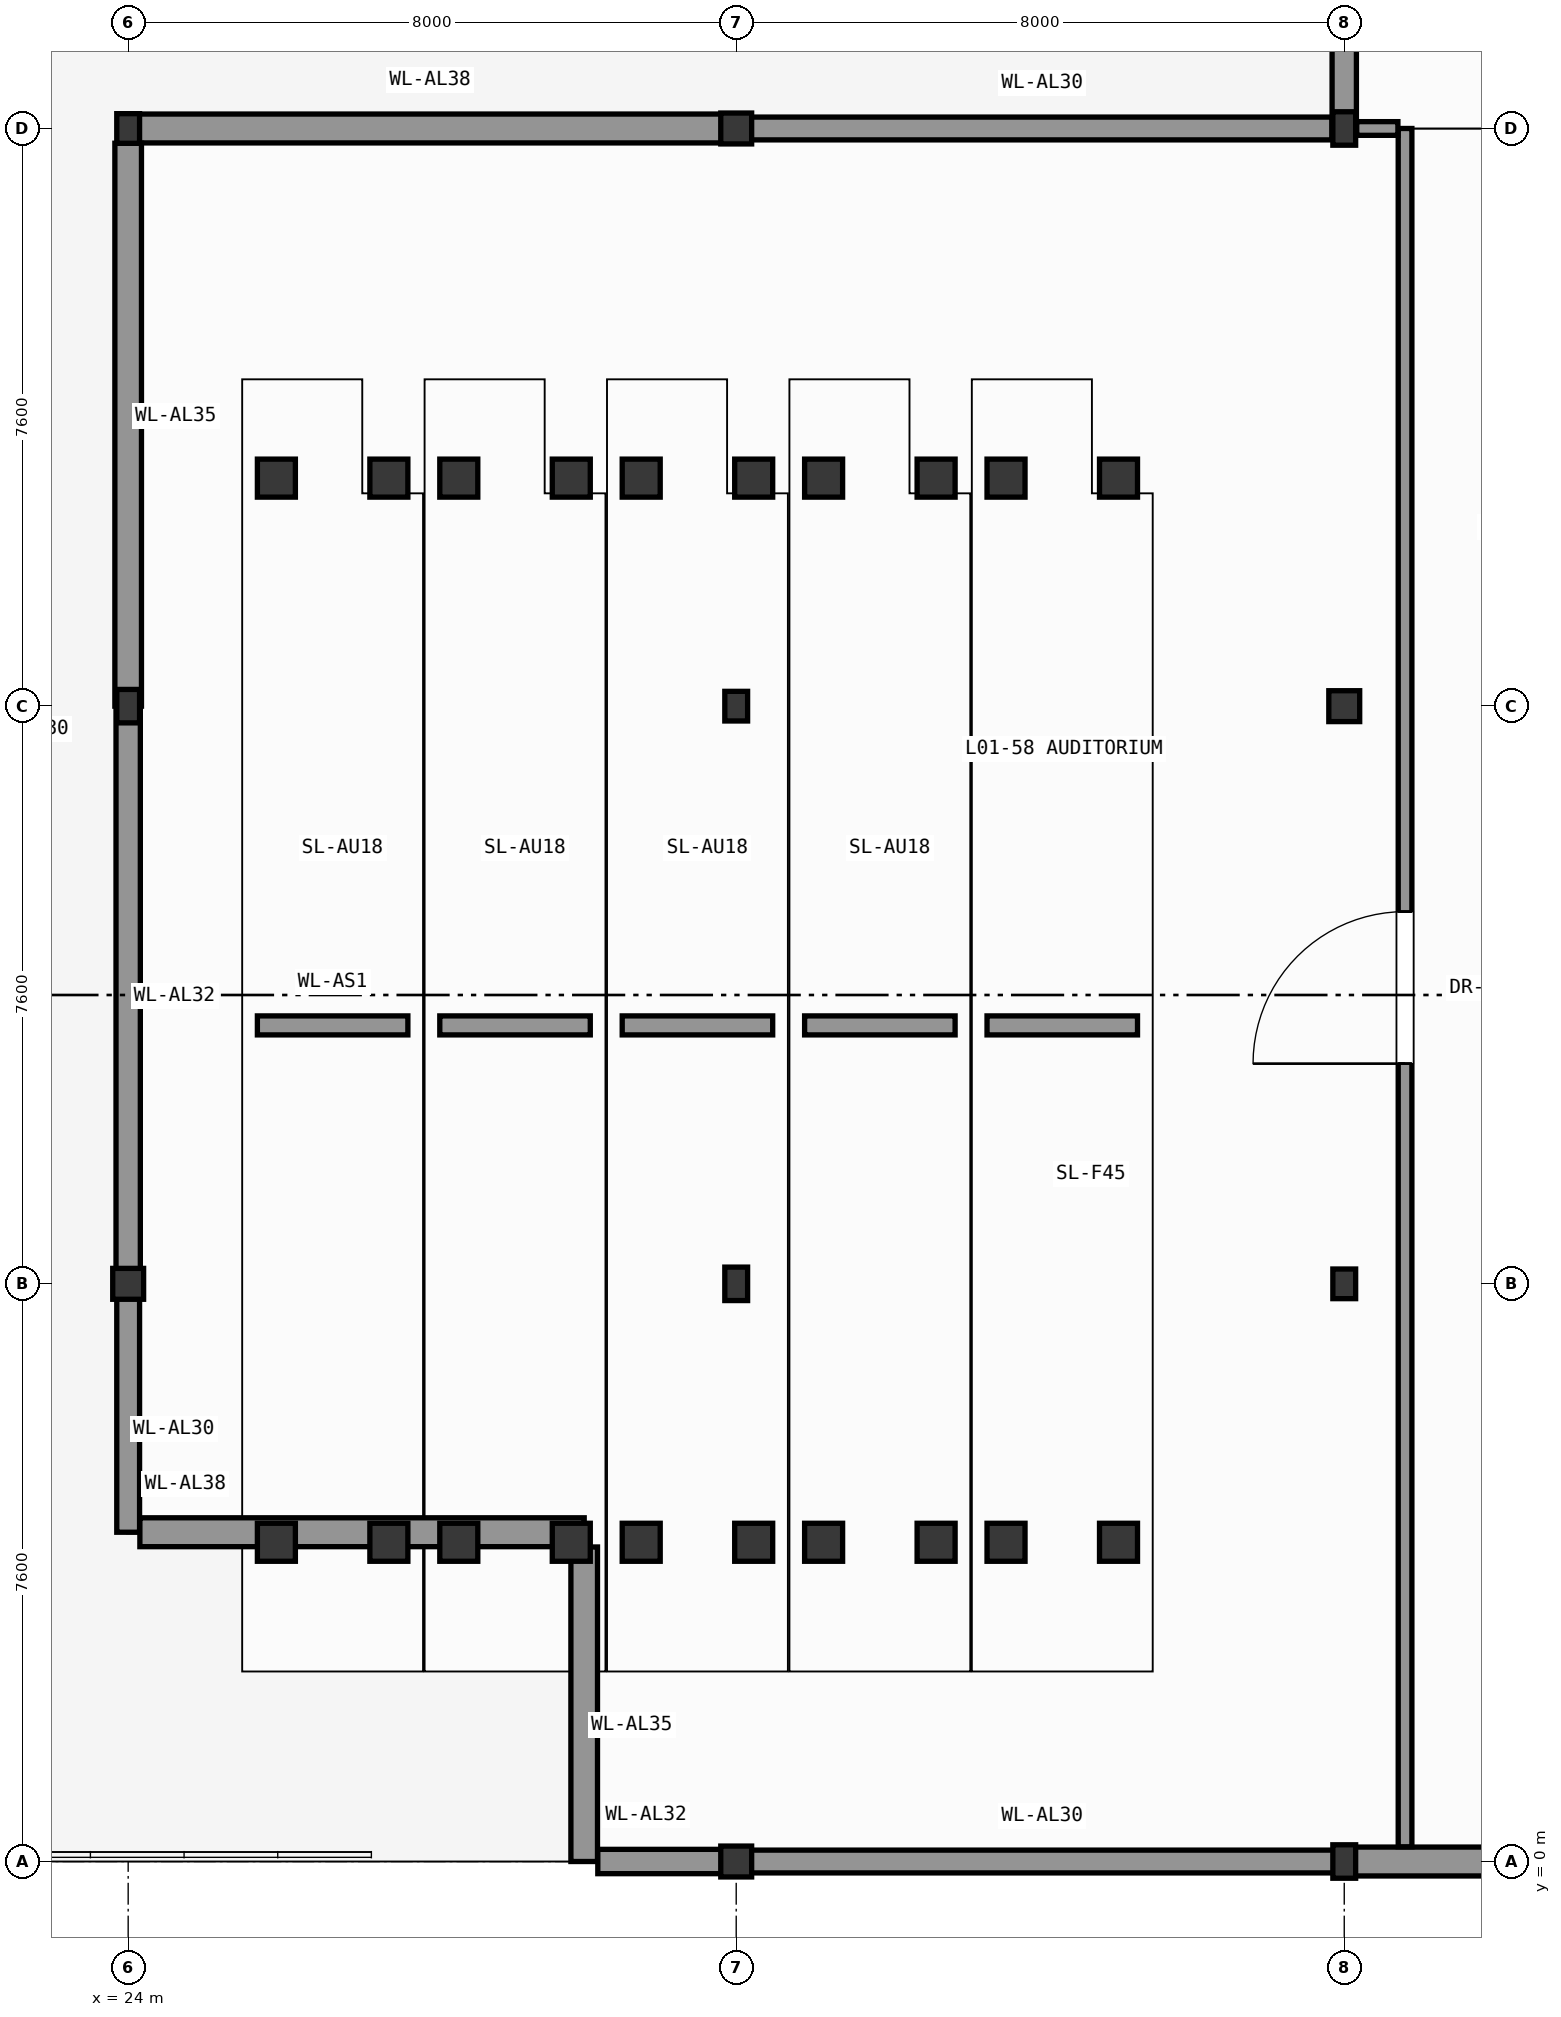
"""IFC4 building model, lengths in metres.
Left out: names, types, materials, properties, quantities, classifications, styles, units other than length and angle.
Written with IfcOpenShell. Run it as: python <this file> out.ifc"""

import sys

from ifc_helpers import new_model, si_unit, direction, frame, frame_2d, origin, origin_2d, place, context, subcontext, project, spatial, rectangle, hollow_circle, i_section, extrude, element, fill, save


model = new_model("IFC4")
c1 = context("Model", 3, precision=1e-05, world=origin(), true_north=direction((0.0, 1.0)))
c2 = subcontext(c1, "Body", "Model", "MODEL_VIEW")
j1 = project(units=[si_unit("LENGTHUNIT", "METRE"), si_unit("PLANEANGLEUNIT", "RADIAN")], contexts=[c1])
p1 = place(None, origin())
s1 = spatial("IfcSite", under=j1, at=p1, CompositionType="ELEMENT")
p2 = place(p1, origin())
s2 = spatial("IfcBuilding", under=s1, at=p2, CompositionType="ELEMENT")
p3 = place(p2, origin())
s3 = spatial("IfcBuildingStorey", under=s2, at=p3, CompositionType="ELEMENT", Elevation=0.0)
p4 = place(p3, frame((24.0, 7.6, 0.0), z_axis=(0.0, 0.0, 1.0), x_axis=(1.0, 0.0, 0.0)))
e1 = element("IfcColumn", 1, at=p4, inside=s3, PredefinedType="COLUMN", context=c2, shape_type="SweptSolid", body=[
    extrude(hollow_circle(Radius=0.203, WallThickness=0.02, at=origin_2d()), origin(), (0.0, 0.0, 1.0), 7.8),
])
p5 = place(p3, frame((24.0, 15.2, 0.0), z_axis=(0.0, 0.0, 1.0), x_axis=(1.0, 0.0, 0.0)))
e2 = element("IfcColumn", 2, at=p5, inside=s3, PredefinedType="COLUMN", context=c2, shape_type="SweptSolid", body=[
    extrude(i_section(OverallWidth=0.3, OverallDepth=0.44, WebThickness=0.011, FlangeThickness=0.021, FilletRadius=0.027, at=origin_2d()), origin(), (0.0, 0.0, 1.0), 7.8),
])
p6 = place(p3, frame((24.0, 22.8, 0.0), z_axis=(0.0, 0.0, 1.0), x_axis=(1.0, 0.0, 0.0)))
e3 = element("IfcColumn", 3, at=p6, inside=s3, PredefinedType="COLUMN", context=c2, shape_type="SweptSolid", body=[
    extrude(i_section(OverallWidth=0.3, OverallDepth=0.39, WebThickness=0.011, FlangeThickness=0.019, FilletRadius=0.027, at=origin_2d()), origin(), (0.0, 0.0, 1.0), 7.8),
])
p7 = place(p3, frame((32.0, 0.0, 0.0), z_axis=(0.0, 0.0, 1.0), x_axis=(1.0, 0.0, 0.0)))
e4 = element("IfcColumn", 4, at=p7, inside=s3, PredefinedType="COLUMN", context=c2, shape_type="SweptSolid", body=[
    extrude(hollow_circle(Radius=0.203, WallThickness=0.02, at=origin_2d()), origin(), (0.0, 0.0, 1.0), 7.8),
])
p8 = place(p3, frame((32.0, 7.6, 0.0), z_axis=(0.0, 0.0, 1.0), x_axis=(1.0, 0.0, 0.0)))
e5 = element("IfcColumn", 5, at=p8, inside=s3, PredefinedType="COLUMN", context=c2, shape_type="SweptSolid", body=[
    extrude(i_section(OverallWidth=0.3, OverallDepth=0.44, WebThickness=0.011, FlangeThickness=0.021, FilletRadius=0.027, at=origin_2d()), origin(), (0.0, 0.0, 1.0), 7.8),
])
p9 = place(p3, frame((32.0, 15.2, 0.0), z_axis=(0.0, 0.0, 1.0), x_axis=(1.0, 0.0, 0.0)))
e6 = element("IfcColumn", 6, at=p9, inside=s3, PredefinedType="COLUMN", context=c2, shape_type="SweptSolid", body=[
    extrude(i_section(OverallWidth=0.3, OverallDepth=0.39, WebThickness=0.011, FlangeThickness=0.019, FilletRadius=0.027, at=origin_2d()), origin(), (0.0, 0.0, 1.0), 7.8),
])
p10 = place(p3, frame((32.0, 22.8, 0.0), z_axis=(0.0, 0.0, 1.0), x_axis=(1.0, 0.0, 0.0)))
e7 = element("IfcColumn", 7, at=p10, inside=s3, PredefinedType="COLUMN", context=c2, shape_type="SweptSolid", body=[
    extrude(hollow_circle(Radius=0.203, WallThickness=0.02, at=origin_2d()), origin(), (0.0, 0.0, 1.0), 7.8),
])
p11 = place(p3, frame((40.0, 0.0, 0.0), z_axis=(0.0, 0.0, 1.0), x_axis=(1.0, 0.0, 0.0)))
e8 = element("IfcColumn", 8, at=p11, inside=s3, PredefinedType="COLUMN", context=c2, shape_type="SweptSolid", body=[
    extrude(i_section(OverallWidth=0.3, OverallDepth=0.44, WebThickness=0.011, FlangeThickness=0.021, FilletRadius=0.027, at=origin_2d()), origin(), (0.0, 0.0, 1.0), 7.8),
])
p12 = place(p3, frame((40.0, 7.6, 0.0), z_axis=(0.0, 0.0, 1.0), x_axis=(1.0, 0.0, 0.0)))
e9 = element("IfcColumn", 9, at=p12, inside=s3, PredefinedType="COLUMN", context=c2, shape_type="SweptSolid", body=[
    extrude(i_section(OverallWidth=0.3, OverallDepth=0.39, WebThickness=0.011, FlangeThickness=0.019, FilletRadius=0.027, at=origin_2d()), origin(), (0.0, 0.0, 1.0), 7.8),
])
p13 = place(p3, frame((40.0, 15.2, 0.0), z_axis=(0.0, 0.0, 1.0), x_axis=(1.0, 0.0, 0.0)))
e10 = element("IfcColumn", 10, at=p13, inside=s3, PredefinedType="COLUMN", context=c2, shape_type="SweptSolid", body=[
    extrude(hollow_circle(Radius=0.203, WallThickness=0.02, at=origin_2d()), origin(), (0.0, 0.0, 1.0), 7.8),
])
p14 = place(p3, frame((40.0, 22.8, 0.0), z_axis=(0.0, 0.0, 1.0), x_axis=(1.0, 0.0, 0.0)))
e11 = element("IfcColumn", 11, at=p14, inside=s3, PredefinedType="COLUMN", context=c2, shape_type="SweptSolid", body=[
    extrude(i_section(OverallWidth=0.3, OverallDepth=0.44, WebThickness=0.011, FlangeThickness=0.021, FilletRadius=0.027, at=origin_2d()), origin(), (0.0, 0.0, 1.0), 7.8),
])
for number, where, z_axis, x_axis in (
    (12, (25.95, 4.2, 0.0), (0.0, 0.0, 1.0), (1.0, 0.0, 0.0)),
    (13, (27.43, 4.2, 0.0), (0.0, 0.0, 1.0), (1.0, 0.0, 0.0)),
    (14, (27.43, 18.2, 0.0), (0.0, 0.0, 1.0), (1.0, 0.0, 0.0)),
    (15, (25.95, 18.2, 0.0), (0.0, 0.0, 1.0), (1.0, 0.0, 0.0)),
):
    element("IfcColumn", number, at=place(p3, frame(where, z_axis=z_axis, x_axis=x_axis)), inside=s3, PredefinedType="COLUMN", context=c2, shape_type="SweptSolid", body=[
        extrude(rectangle(XDim=0.5, YDim=0.5, at=origin_2d()), origin(), (0.0, 0.0, 1.0), 0.19),
    ])
p15 = place(p3, frame((25.7, 11.0, 0.0), z_axis=(0.0, 0.0, 1.0), x_axis=(1.0, 0.0, 0.0)))
e16 = element("IfcWall", 16, at=p15, inside=s3, PredefinedType="SHEAR", context=c2, shape_type="SweptSolid", body=[
    extrude(rectangle(XDim=1.98, YDim=0.25, at=frame_2d((0.99, 0.0))), origin(), (0.0, 0.0, 1.0), 0.18),
])
for number, where, z_axis, x_axis in (
    (17, (28.35, 4.2, 0.0), (0.0, 0.0, 1.0), (1.0, 0.0, 0.0)),
    (18, (29.83, 4.2, 0.0), (0.0, 0.0, 1.0), (1.0, 0.0, 0.0)),
    (19, (29.83, 18.2, 0.0), (0.0, 0.0, 1.0), (1.0, 0.0, 0.0)),
    (20, (28.35, 18.2, 0.0), (0.0, 0.0, 1.0), (1.0, 0.0, 0.0)),
):
    element("IfcColumn", number, at=place(p3, frame(where, z_axis=z_axis, x_axis=x_axis)), inside=s3, PredefinedType="COLUMN", context=c2, shape_type="SweptSolid", body=[
        extrude(rectangle(XDim=0.5, YDim=0.5, at=origin_2d()), origin(), (0.0, 0.0, 1.0), 0.55),
    ])
p16 = place(p3, frame((28.1, 11.0, 0.0), z_axis=(0.0, 0.0, 1.0), x_axis=(1.0, 0.0, 0.0)))
e21 = element("IfcWall", 21, at=p16, inside=s3, PredefinedType="SHEAR", context=c2, shape_type="SweptSolid", body=[
    extrude(rectangle(XDim=1.98, YDim=0.25, at=frame_2d((0.99, 0.0))), origin(), (0.0, 0.0, 1.0), 0.54),
])
for number, where, z_axis, x_axis in (
    (22, (30.75, 4.2, 0.0), (0.0, 0.0, 1.0), (1.0, 0.0, 0.0)),
    (23, (32.23, 4.2, 0.0), (0.0, 0.0, 1.0), (1.0, 0.0, 0.0)),
    (24, (32.23, 18.2, 0.0), (0.0, 0.0, 1.0), (1.0, 0.0, 0.0)),
    (25, (30.75, 18.2, 0.0), (0.0, 0.0, 1.0), (1.0, 0.0, 0.0)),
):
    element("IfcColumn", number, at=place(p3, frame(where, z_axis=z_axis, x_axis=x_axis)), inside=s3, PredefinedType="COLUMN", context=c2, shape_type="SweptSolid", body=[
        extrude(rectangle(XDim=0.5, YDim=0.5, at=origin_2d()), origin(), (0.0, 0.0, 1.0), 0.91),
    ])
p17 = place(p3, frame((30.5, 11.0, 0.0), z_axis=(0.0, 0.0, 1.0), x_axis=(1.0, 0.0, 0.0)))
e26 = element("IfcWall", 26, at=p17, inside=s3, PredefinedType="SHEAR", context=c2, shape_type="SweptSolid", body=[
    extrude(rectangle(XDim=1.98, YDim=0.25, at=frame_2d((0.99, 0.0))), origin(), (0.0, 0.0, 1.0), 0.9),
])
for number, where, z_axis, x_axis in (
    (27, (33.15, 4.2, 0.0), (0.0, 0.0, 1.0), (1.0, 0.0, 0.0)),
    (28, (34.63, 4.2, 0.0), (0.0, 0.0, 1.0), (1.0, 0.0, 0.0)),
    (29, (34.63, 18.2, 0.0), (0.0, 0.0, 1.0), (1.0, 0.0, 0.0)),
    (30, (33.15, 18.2, 0.0), (0.0, 0.0, 1.0), (1.0, 0.0, 0.0)),
):
    element("IfcColumn", number, at=place(p3, frame(where, z_axis=z_axis, x_axis=x_axis)), inside=s3, PredefinedType="COLUMN", context=c2, shape_type="SweptSolid", body=[
        extrude(rectangle(XDim=0.5, YDim=0.5, at=origin_2d()), origin(), (0.0, 0.0, 1.0), 1.27),
    ])
p18 = place(p3, frame((32.9, 11.0, 0.0), z_axis=(0.0, 0.0, 1.0), x_axis=(1.0, 0.0, 0.0)))
e31 = element("IfcWall", 31, at=p18, inside=s3, PredefinedType="SHEAR", context=c2, shape_type="SweptSolid", body=[
    extrude(rectangle(XDim=1.98, YDim=0.25, at=frame_2d((0.99, 0.0))), origin(), (0.0, 0.0, 1.0), 1.26),
])
for number, where, z_axis, x_axis in (
    (32, (35.55, 4.2, 0.0), (0.0, 0.0, 1.0), (1.0, 0.0, 0.0)),
    (33, (37.03, 4.2, 0.0), (0.0, 0.0, 1.0), (1.0, 0.0, 0.0)),
    (34, (37.03, 18.2, 0.0), (0.0, 0.0, 1.0), (1.0, 0.0, 0.0)),
    (35, (35.55, 18.2, 0.0), (0.0, 0.0, 1.0), (1.0, 0.0, 0.0)),
):
    element("IfcColumn", number, at=place(p3, frame(where, z_axis=z_axis, x_axis=x_axis)), inside=s3, PredefinedType="COLUMN", context=c2, shape_type="SweptSolid", body=[
        extrude(rectangle(XDim=0.5, YDim=0.5, at=origin_2d()), origin(), (0.0, 0.0, 1.0), 1.63),
    ])
p19 = place(p3, frame((35.3, 11.0, 0.0), z_axis=(0.0, 0.0, 1.0), x_axis=(1.0, 0.0, 0.0)))
e36 = element("IfcWall", 36, at=p19, inside=s3, PredefinedType="SHEAR", context=c2, shape_type="SweptSolid", body=[
    extrude(rectangle(XDim=1.98, YDim=0.25, at=frame_2d((0.99, 0.0))), origin(), (0.0, 0.0, 1.0), 1.62),
])
p20 = place(p3, frame((40.0, 22.8, 0.0), z_axis=(0.0, 0.0, 1.0), x_axis=(0.0, 1.0, 0.0)))
e37 = element("IfcWall", 37, at=p20, inside=s3, PredefinedType="SOLIDWALL", context=c2, shape_type="SweptSolid", body=[
    extrude(rectangle(XDim=7.6, YDim=0.32, at=frame_2d((3.8, 0.0))), origin(), (0.0, 0.0, 1.0), 7.025),
])
p21 = place(p20, frame((2.6, 0.0, 0.95)))
e38 = element("IfcOpeningElement", 38, at=p21, cuts=e37, PredefinedType="OPENING", context=c2, shape_type="SweptSolid", body=[
    extrude(rectangle(XDim=2.4, YDim=3.0, at=frame_2d((1.2, 1.5))), frame((0.0, 0.17, 0.0), z_axis=(0.0, -1.0, 0.0), x_axis=(1.0, 0.0, 0.0)), (0.0, 0.0, 1.0), 0.34),
])
p22 = place(p3, frame((32.0, 22.8, 0.0), z_axis=(0.0, 0.0, 1.0), x_axis=(1.0, 0.0, 0.0)))
e39 = element("IfcWall", 39, at=p22, inside=s3, PredefinedType="SOLIDWALL", context=c2, shape_type="SweptSolid", body=[
    extrude(rectangle(XDim=7.836, YDim=0.3, at=frame_2d((3.918, 0.0))), origin(), (0.0, 0.0, 1.0), 7.165),
])
p23 = place(p3, frame((24.0, 22.8, 0.0), z_axis=(0.0, 0.0, 1.0), x_axis=(1.0, 0.0, 0.0)))
e40 = element("IfcWall", 40, at=p23, inside=s3, PredefinedType="SOLIDWALL", context=c2, shape_type="SweptSolid", body=[
    extrude(rectangle(XDim=8.0, YDim=0.38, at=frame_2d((4.0, 0.0))), origin(), (0.0, 0.0, 1.0), 7.225),
])
p24 = place(p3, frame((24.0, 15.2, 0.0), z_axis=(0.0, 0.0, 1.0), x_axis=(0.0, 1.0, 0.0)))
e41 = element("IfcWall", 41, at=p24, inside=s3, PredefinedType="SOLIDWALL", context=c2, shape_type="SweptSolid", body=[
    extrude(rectangle(XDim=7.406, YDim=0.35, at=frame_2d((3.703, 0.0))), origin(), (0.0, 0.0, 1.0), 7.025),
])
p25 = place(p3, frame((24.0, 7.6, 0.0), z_axis=(0.0, 0.0, 1.0), x_axis=(0.0, 1.0, 0.0)))
e42 = element("IfcWall", 42, at=p25, inside=s3, PredefinedType="SOLIDWALL", context=c2, shape_type="SweptSolid", body=[
    extrude(rectangle(XDim=7.6, YDim=0.32, at=frame_2d((3.8, 0.0))), origin(), (0.0, 0.0, 1.0), 7.025),
])
p26 = place(p3, frame((24.0, 4.332, 0.0), z_axis=(0.0, 0.0, 1.0), x_axis=(0.0, 1.0, 0.0)))
e43 = element("IfcWall", 43, at=p26, inside=s3, PredefinedType="SOLIDWALL", context=c2, shape_type="SweptSolid", body=[
    extrude(rectangle(XDim=3.268, YDim=0.3, at=frame_2d((1.634, 0.0))), origin(), (0.0, 0.0, 1.0), 7.54),
])
p27 = place(p3, frame((30.0, 4.332, 0.0), z_axis=(0.0, 0.0, 1.0), x_axis=(-1.0, 0.0, 0.0)))
e44 = element("IfcWall", 44, at=p27, inside=s3, PredefinedType="SOLIDWALL", context=c2, shape_type="SweptSolid", body=[
    extrude(rectangle(XDim=5.846, YDim=0.38, at=frame_2d((2.923, 0.0))), origin(), (0.0, 0.0, 1.0), 7.54),
])
p28 = place(p3, frame((30.0, 0.0, 0.0), z_axis=(0.0, 0.0, 1.0), x_axis=(0.0, 1.0, 0.0)))
e45 = element("IfcWall", 45, at=p28, inside=s3, PredefinedType="SOLIDWALL", context=c2, shape_type="SweptSolid", body=[
    extrude(rectangle(XDim=4.138, YDim=0.35, at=frame_2d((2.069, 0.0))), origin(), (0.0, 0.0, 1.0), 7.54),
])
p29 = place(p3, frame((32.0, 0.0, 0.0), z_axis=(0.0, 0.0, 1.0), x_axis=(-1.0, 0.0, 0.0)))
e46 = element("IfcWall", 46, at=p29, inside=s3, PredefinedType="SOLIDWALL", context=c2, shape_type="SweptSolid", body=[
    extrude(rectangle(XDim=1.821, YDim=0.32, at=frame_2d((0.911, 0.0))), origin(), (0.0, 0.0, 1.0), 7.54),
])
p30 = place(p3, frame((40.0, 0.0, 0.0), z_axis=(0.0, 0.0, 1.0), x_axis=(-1.0, 0.0, 0.0)))
e47 = element("IfcWall", 47, at=p30, inside=s3, PredefinedType="SOLIDWALL", context=c2, shape_type="SweptSolid", body=[
    extrude(rectangle(XDim=8.0, YDim=0.3, at=frame_2d((4.0, 0.0))), origin(), (0.0, 0.0, 1.0), 7.135),
])
p31 = place(p3, frame((48.0, 0.0, 0.0), z_axis=(0.0, 0.0, 1.0), x_axis=(-1.0, 0.0, 0.0)))
e48 = element("IfcWall", 48, at=p31, inside=s3, PredefinedType="SOLIDWALL", context=c2, shape_type="SweptSolid", body=[
    extrude(rectangle(XDim=8.0, YDim=0.38, at=frame_2d((4.0, 0.0))), origin(), (0.0, 0.0, 1.0), 7.135),
])
p32 = place(p31, frame((3.0, 0.0, 0.0)))
e49 = element("IfcOpeningElement", 49, at=p32, cuts=e48, PredefinedType="OPENING", context=c2, shape_type="SweptSolid", body=[
    extrude(rectangle(XDim=2.0, YDim=2.6, at=frame_2d((1.0, 1.3))), frame((0.0, 0.2, 0.0), z_axis=(0.0, -1.0, 0.0), x_axis=(1.0, 0.0, 0.0)), (0.0, 0.0, 1.0), 0.4),
])
p33 = place(p3, frame((40.8, 0.194, 0.0), z_axis=(0.0, 0.0, 1.0), x_axis=(0.0, 1.0, 0.0)))
e50 = element("IfcWall", 50, at=p33, inside=s3, PredefinedType="PARTITIONING", context=c2, shape_type="SweptSolid", body=[
    extrude(rectangle(XDim=22.606, YDim=0.18, at=frame_2d((11.303, 0.0))), origin(), (0.0, 0.0, 1.0), 7.54),
])
p34 = place(p33, frame((10.303, 0.0, 0.0)))
e51 = element("IfcOpeningElement", 51, at=p34, cuts=e50, PredefinedType="OPENING", context=c2, shape_type="SweptSolid", body=[
    extrude(rectangle(XDim=2.0, YDim=2.4, at=frame_2d((1.0, 1.2))), frame((0.0, 0.1, 0.0), z_axis=(0.0, -1.0, 0.0), x_axis=(1.0, 0.0, 0.0)), (0.0, 0.0, 1.0), 0.2),
])
p35 = place(p3, frame((40.164, 22.8, 0.0), z_axis=(0.0, 0.0, 1.0), x_axis=(1.0, 0.0, 0.0)))
e52 = element("IfcWall", 52, at=p35, inside=s3, PredefinedType="PARTITIONING", context=c2, shape_type="SweptSolid", body=[
    extrude(rectangle(XDim=0.542, YDim=0.18, at=frame_2d((0.271, 0.0))), origin(), (0.0, 0.0, 1.0), 7.075),
])
p36 = place(p34, origin())
e53 = element("IfcDoor", 53, at=p36, inside=s3, OperationType="SINGLE_SWING_LEFT", PredefinedType="DOOR", context=c2, shape_type="SweptSolid", body=[
    extrude(rectangle(XDim=2.0, YDim=2.4, at=frame_2d((1.0, 1.2))), frame((0.0, 0.025, 0.0), z_axis=(0.0, -1.0, 0.0), x_axis=(1.0, 0.0, 0.0)), (0.0, 0.0, 1.0), 0.05),
])
fill(e51, e53)
save(model, sys.argv[1])
